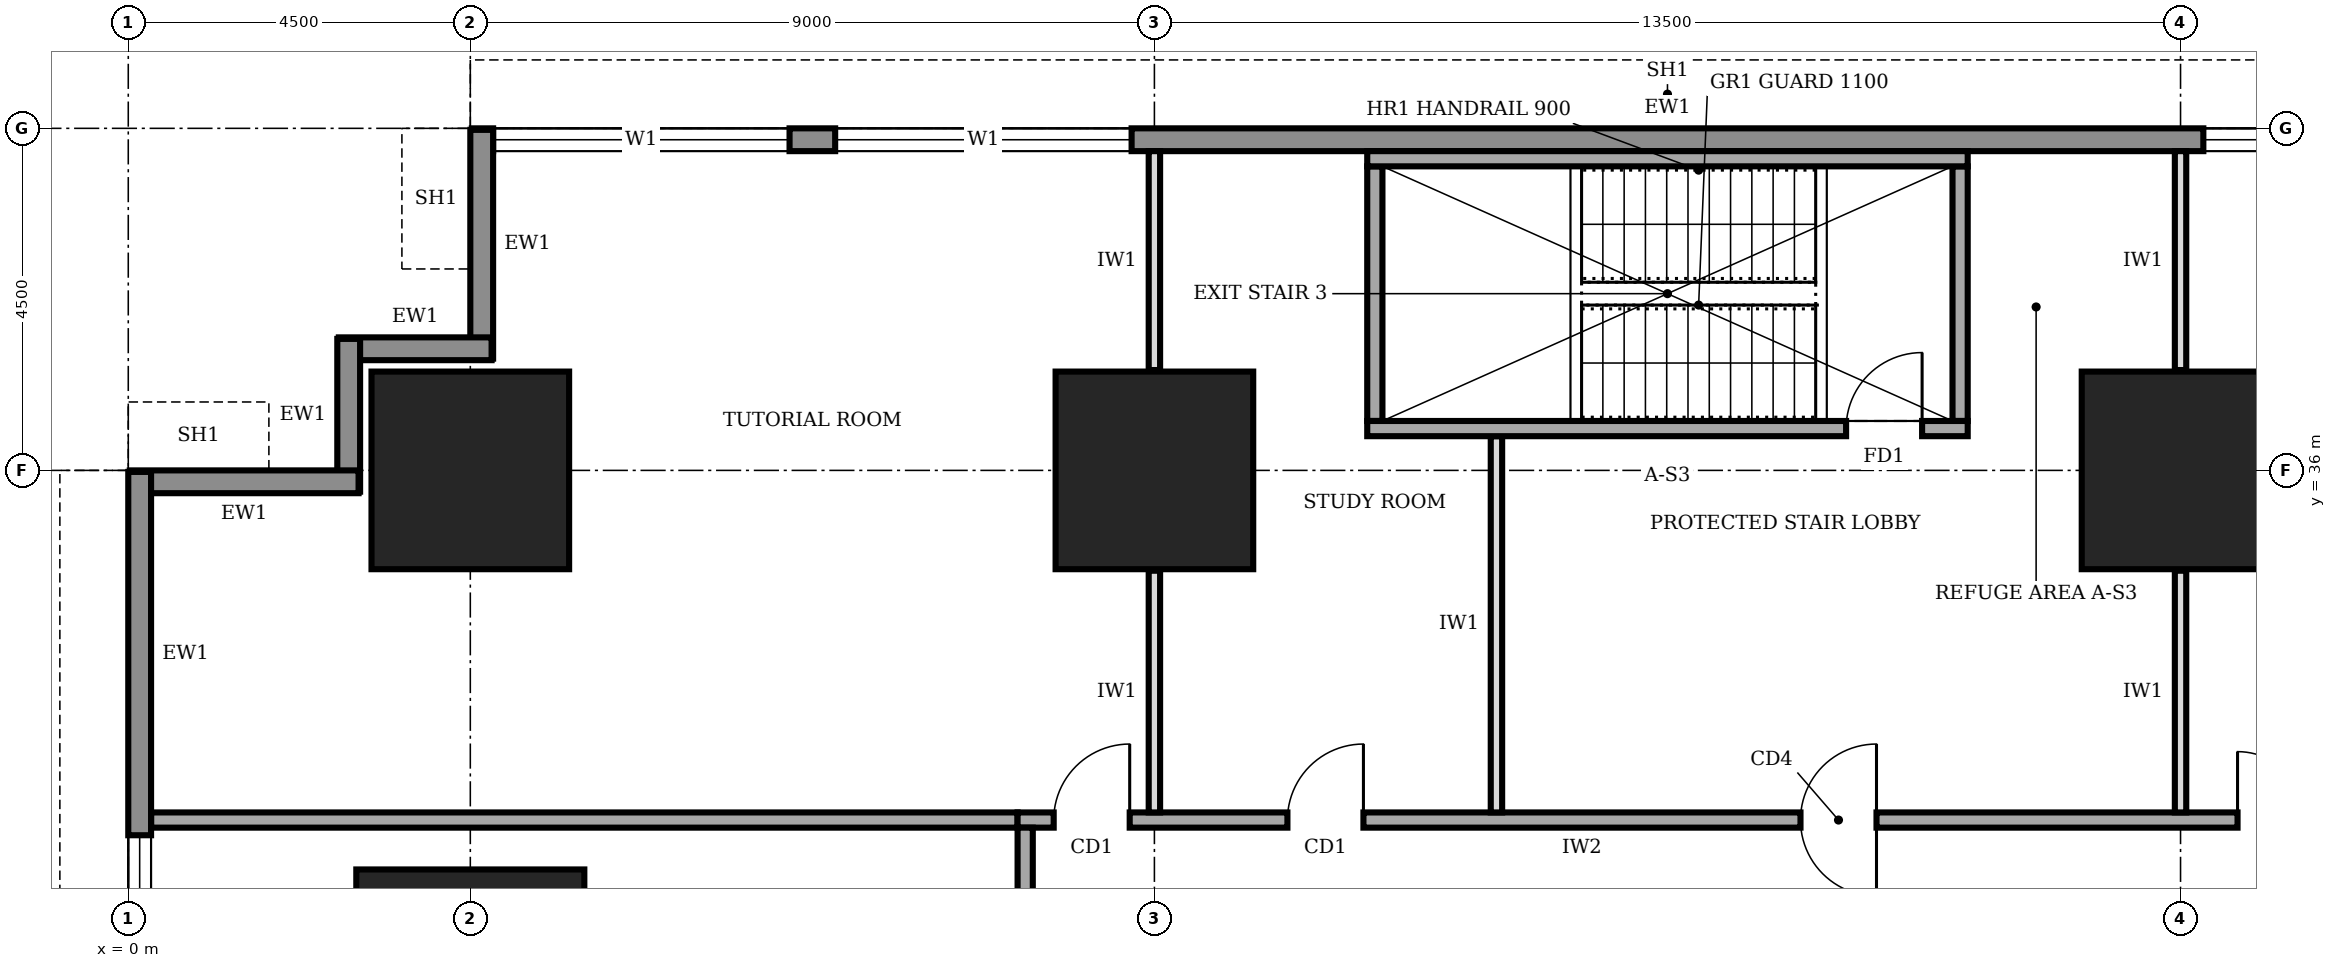
"""IFC4 building model, lengths in metres.
Left out: names, types, materials, properties, quantities, classifications, styles, units other than length and angle.
Written with IfcOpenShell. Run it as: python <this file> out.ifc"""

import sys

from ifc_helpers import new_model, si_unit, direction, frame, frame_2d, origin, origin_2d, place, context, subcontext, project, spatial, rectangle, extrude, element, fill, save


model = new_model("IFC4")
c1 = context("Model", 3, precision=1e-05, world=origin(), true_north=direction((0.0, 1.0)))
c2 = subcontext(c1, "Body", "Model", "MODEL_VIEW")
j1 = project(units=[si_unit("LENGTHUNIT", "METRE"), si_unit("PLANEANGLEUNIT", "RADIAN")], contexts=[c1])
p1 = place(None, origin())
s1 = spatial("IfcSite", under=j1, at=p1, CompositionType="ELEMENT")
p2 = place(p1, origin())
s2 = spatial("IfcBuilding", under=s1, at=p2, CompositionType="ELEMENT")
p3 = place(p2, frame((0.0, 0.0, 41.0)))
s3 = spatial("IfcBuildingStorey", under=s2, at=p3, CompositionType="ELEMENT", Elevation=41.0)
p4 = place(p3, frame((4.5, 29.25, 0.0), z_axis=(0.0, 0.0, 1.0), x_axis=(1.0, 0.0, 0.0)))
e1 = element("IfcColumn", 1, at=p4, inside=s3, PredefinedType="COLUMN", context=c2, shape_type="SweptSolid", body=[
    extrude(rectangle(XDim=3.0, YDim=3.0, at=origin_2d()), origin(), (0.0, 0.0, 1.0), 4.0),
])
for number, where, z_axis, x_axis in (
    (2, (4.5, 36.0, 0.0), (0.0, 0.0, 1.0), (1.0, 0.0, 0.0)),
    (3, (13.5, 36.0, 0.0), (0.0, 0.0, 1.0), (1.0, 0.0, 0.0)),
    (4, (27.0, 36.0, 0.0), (0.0, 0.0, 1.0), (1.0, 0.0, 0.0)),
):
    element("IfcColumn", number, at=place(p3, frame(where, z_axis=z_axis, x_axis=x_axis)), inside=s3, PredefinedType="COLUMN", context=c2, shape_type="SweptSolid", body=[
        extrude(rectangle(XDim=2.6, YDim=2.6, at=origin_2d()), origin(), (0.0, 0.0, 1.0), 4.0),
    ])
p5 = place(p3, frame((35.98, 40.35, 0.0), z_axis=(0.0, 0.0, 1.0), x_axis=(-1.0, 0.0, 0.0)))
e5 = element("IfcWall", 5, at=p5, inside=s3, PredefinedType="STANDARD", context=c2, shape_type="SweptSolid", body=[
    extrude(rectangle(XDim=31.46, YDim=0.3, at=frame_2d((15.73, 0.0))), origin(), (0.0, 0.0, 1.0), 3.75),
])
p6 = place(p5, frame((27.28, 0.0, 0.9)))
e6 = element("IfcOpeningElement", 6, at=p6, cuts=e5, PredefinedType="OPENING", context=c2, shape_type="SweptSolid", body=[
    extrude(rectangle(XDim=3.9, YDim=2.2, at=frame_2d((1.95, 1.1))), frame((0.0, 0.16, 0.0), z_axis=(0.0, -1.0, 0.0), x_axis=(1.0, 0.0, 0.0)), (0.0, 0.0, 1.0), 0.32),
])
p7 = place(p5, frame((22.78, 0.0, 0.9)))
e7 = element("IfcOpeningElement", 7, at=p7, cuts=e5, PredefinedType="OPENING", context=c2, shape_type="SweptSolid", body=[
    extrude(rectangle(XDim=3.9, YDim=2.2, at=frame_2d((1.95, 1.1))), frame((0.0, 0.16, 0.0), z_axis=(0.0, -1.0, 0.0), x_axis=(1.0, 0.0, 0.0)), (0.0, 0.0, 1.0), 0.32),
])
p8 = place(p5, frame((4.78, 0.0, 0.9)))
e8 = element("IfcOpeningElement", 8, at=p8, cuts=e5, PredefinedType="OPENING", context=c2, shape_type="SweptSolid", body=[
    extrude(rectangle(XDim=3.9, YDim=2.2, at=frame_2d((1.95, 1.1))), frame((0.0, 0.16, 0.0), z_axis=(0.0, -1.0, 0.0), x_axis=(1.0, 0.0, 0.0)), (0.0, 0.0, 1.0), 0.32),
])
p9 = place(p3, frame((4.65, 40.48, 0.0), z_axis=(0.0, 0.0, 1.0), x_axis=(0.0, -1.0, 0.0)))
e9 = element("IfcWall", 9, at=p9, inside=s3, PredefinedType="STANDARD", context=c2, shape_type="SweptSolid", body=[
    extrude(rectangle(XDim=3.01, YDim=0.3, at=frame_2d((1.505, 0.0))), origin(), (0.0, 0.0, 1.0), 2.85),
])
for number, where, z_axis, x_axis in (
    (10, (4.78, 37.6, 0.0), (0.0, 0.0, 1.0), (-1.0, 0.0, 0.0)),
    (11, (2.9, 37.73, 0.0), (0.0, 0.0, 1.0), (0.0, -1.0, 0.0)),
):
    element("IfcWall", number, at=place(p3, frame(where, z_axis=z_axis, x_axis=x_axis)), inside=s3, PredefinedType="STANDARD", context=c2, shape_type="SweptSolid", body=[
        extrude(rectangle(XDim=2.01, YDim=0.3, at=frame_2d((1.005, 0.0))), origin(), (0.0, 0.0, 1.0), 3.75),
    ])
p10 = place(p3, frame((3.03, 35.85, 0.0), z_axis=(0.0, 0.0, 1.0), x_axis=(-1.0, 0.0, 0.0)))
e12 = element("IfcWall", 12, at=p10, inside=s3, PredefinedType="STANDARD", context=c2, shape_type="SweptSolid", body=[
    extrude(rectangle(XDim=3.01, YDim=0.3, at=frame_2d((1.505, 0.0))), origin(), (0.0, 0.0, 1.0), 2.85),
])
p11 = place(p3, frame((0.15, 35.98, 0.0), z_axis=(0.0, 0.0, 1.0), x_axis=(0.0, -1.0, 0.0)))
e13 = element("IfcWall", 13, at=p11, inside=s3, PredefinedType="STANDARD", context=c2, shape_type="SweptSolid", body=[
    extrude(rectangle(XDim=31.46, YDim=0.3, at=frame_2d((15.73, 0.0))), origin(), (0.0, 0.0, 1.0), 3.75),
])
p12 = place(p11, frame((27.28, 0.0, 0.9)))
e14 = element("IfcOpeningElement", 14, at=p12, cuts=e13, PredefinedType="OPENING", context=c2, shape_type="SweptSolid", body=[
    extrude(rectangle(XDim=3.9, YDim=2.2, at=frame_2d((1.95, 1.1))), frame((0.0, 0.16, 0.0), z_axis=(0.0, -1.0, 0.0), x_axis=(1.0, 0.0, 0.0)), (0.0, 0.0, 1.0), 0.32),
])
p13 = place(p11, frame((22.78, 0.0, 0.9)))
e15 = element("IfcOpeningElement", 15, at=p13, cuts=e13, PredefinedType="OPENING", context=c2, shape_type="SweptSolid", body=[
    extrude(rectangle(XDim=3.9, YDim=2.2, at=frame_2d((1.95, 1.1))), frame((0.0, 0.16, 0.0), z_axis=(0.0, -1.0, 0.0), x_axis=(1.0, 0.0, 0.0)), (0.0, 0.0, 1.0), 0.32),
])
p14 = place(p11, frame((18.28, 0.0, 0.9)))
e16 = element("IfcOpeningElement", 16, at=p14, cuts=e13, PredefinedType="OPENING", context=c2, shape_type="SweptSolid", body=[
    extrude(rectangle(XDim=3.9, YDim=2.2, at=frame_2d((1.95, 1.1))), frame((0.0, 0.16, 0.0), z_axis=(0.0, -1.0, 0.0), x_axis=(1.0, 0.0, 0.0)), (0.0, 0.0, 1.0), 0.32),
])
p15 = place(p11, frame((13.78, 0.0, 0.9)))
e17 = element("IfcOpeningElement", 17, at=p15, cuts=e13, PredefinedType="OPENING", context=c2, shape_type="SweptSolid", body=[
    extrude(rectangle(XDim=3.9, YDim=2.2, at=frame_2d((1.95, 1.1))), frame((0.0, 0.16, 0.0), z_axis=(0.0, -1.0, 0.0), x_axis=(1.0, 0.0, 0.0)), (0.0, 0.0, 1.0), 0.32),
])
p16 = place(p11, frame((9.28, 0.0, 0.9)))
e18 = element("IfcOpeningElement", 18, at=p16, cuts=e13, PredefinedType="OPENING", context=c2, shape_type="SweptSolid", body=[
    extrude(rectangle(XDim=3.9, YDim=2.2, at=frame_2d((1.95, 1.1))), frame((0.0, 0.16, 0.0), z_axis=(0.0, -1.0, 0.0), x_axis=(1.0, 0.0, 0.0)), (0.0, 0.0, 1.0), 0.32),
])
p17 = place(p11, frame((4.78, 0.0, 0.9)))
e19 = element("IfcOpeningElement", 19, at=p17, cuts=e13, PredefinedType="OPENING", context=c2, shape_type="SweptSolid", body=[
    extrude(rectangle(XDim=3.9, YDim=2.2, at=frame_2d((1.95, 1.1))), frame((0.0, 0.16, 0.0), z_axis=(0.0, -1.0, 0.0), x_axis=(1.0, 0.0, 0.0)), (0.0, 0.0, 1.0), 0.32),
])
p18 = place(p3, frame((30.1, 31.4, 0.0), z_axis=(0.0, 0.0, 1.0), x_axis=(-1.0, 0.0, 0.0)))
e20 = element("IfcWall", 20, at=p18, inside=s3, PredefinedType="SOLIDWALL", context=c2, shape_type="SweptSolid", body=[
    extrude(rectangle(XDim=18.4, YDim=0.2, at=frame_2d((9.2, 0.0))), origin(), (0.0, 0.0, 1.0), 3.75),
])
p19 = place(p18, frame((16.925, 0.0, 0.0)))
e21 = element("IfcOpeningElement", 21, at=p19, cuts=e20, PredefinedType="OPENING", context=c2, shape_type="SweptSolid", body=[
    extrude(rectangle(XDim=1.0, YDim=2.1, at=frame_2d((0.5, 1.05))), frame((0.0, 0.11, 0.0), z_axis=(0.0, -1.0, 0.0), x_axis=(1.0, 0.0, 0.0)), (0.0, 0.0, 1.0), 0.22),
])
p20 = place(p18, frame((13.85, 0.0, 0.0)))
e22 = element("IfcOpeningElement", 22, at=p20, cuts=e20, PredefinedType="OPENING", context=c2, shape_type="SweptSolid", body=[
    extrude(rectangle(XDim=1.0, YDim=2.1, at=frame_2d((0.5, 1.05))), frame((0.0, 0.11, 0.0), z_axis=(0.0, -1.0, 0.0), x_axis=(1.0, 0.0, 0.0)), (0.0, 0.0, 1.0), 0.22),
])
p21 = place(p18, frame((7.1, 0.0, 0.0)))
e23 = element("IfcOpeningElement", 23, at=p21, cuts=e20, PredefinedType="OPENING", context=c2, shape_type="SweptSolid", body=[
    extrude(rectangle(XDim=1.0, YDim=2.1, at=frame_2d((0.5, 1.05))), frame((0.0, 0.11, 0.0), z_axis=(0.0, -1.0, 0.0), x_axis=(1.0, 0.0, 0.0)), (0.0, 0.0, 1.0), 0.22),
])
p22 = place(p18, frame((0.55, 0.0, 0.0)))
e24 = element("IfcOpeningElement", 24, at=p22, cuts=e20, PredefinedType="OPENING", context=c2, shape_type="SweptSolid", body=[
    extrude(rectangle(XDim=1.8, YDim=2.1, at=frame_2d((0.9, 1.05))), frame((0.0, 0.11, 0.0), z_axis=(0.0, -1.0, 0.0), x_axis=(1.0, 0.0, 0.0)), (0.0, 0.0, 1.0), 0.22),
])
p23 = place(p3, frame((11.8, 31.3, 0.0), z_axis=(0.0, 0.0, 1.0), x_axis=(0.0, -1.0, 0.0)))
e25 = element("IfcWall", 25, at=p23, inside=s3, PredefinedType="SOLIDWALL", context=c2, shape_type="SweptSolid", body=[
    extrude(rectangle(XDim=22.3, YDim=0.2, at=frame_2d((11.15, 0.0))), origin(), (0.0, 0.0, 1.0), 3.75),
])
p24 = place(p23, frame((19.55, 0.0, 0.0)))
e26 = element("IfcOpeningElement", 26, at=p24, cuts=e25, PredefinedType="OPENING", context=c2, shape_type="SweptSolid", body=[
    extrude(rectangle(XDim=1.0, YDim=2.1, at=frame_2d((0.5, 1.05))), frame((0.0, 0.11, 0.0), z_axis=(0.0, -1.0, 0.0), x_axis=(1.0, 0.0, 0.0)), (0.0, 0.0, 1.0), 0.22),
])
p25 = place(p23, frame((16.15, 0.0, 0.0)))
e27 = element("IfcOpeningElement", 27, at=p25, cuts=e25, PredefinedType="OPENING", context=c2, shape_type="SweptSolid", body=[
    extrude(rectangle(XDim=0.9, YDim=2.1, at=frame_2d((0.45, 1.05))), frame((0.0, 0.11, 0.0), z_axis=(0.0, -1.0, 0.0), x_axis=(1.0, 0.0, 0.0)), (0.0, 0.0, 1.0), 0.22),
])
p26 = place(p23, frame((12.95, 0.0, 0.0)))
e28 = element("IfcOpeningElement", 28, at=p26, cuts=e25, PredefinedType="OPENING", context=c2, shape_type="SweptSolid", body=[
    extrude(rectangle(XDim=0.9, YDim=2.1, at=frame_2d((0.45, 1.05))), frame((0.0, 0.11, 0.0), z_axis=(0.0, -1.0, 0.0), x_axis=(1.0, 0.0, 0.0)), (0.0, 0.0, 1.0), 0.22),
])
p27 = place(p23, frame((7.4, 0.0, 0.0)))
e29 = element("IfcOpeningElement", 29, at=p27, cuts=e25, PredefinedType="OPENING", context=c2, shape_type="SweptSolid", body=[
    extrude(rectangle(XDim=0.9, YDim=2.1, at=frame_2d((0.45, 1.05))), frame((0.0, 0.11, 0.0), z_axis=(0.0, -1.0, 0.0), x_axis=(1.0, 0.0, 0.0)), (0.0, 0.0, 1.0), 0.22),
])
p28 = place(p23, frame((4.8, 0.0, 0.0)))
e30 = element("IfcOpeningElement", 30, at=p28, cuts=e25, PredefinedType="OPENING", context=c2, shape_type="SweptSolid", body=[
    extrude(rectangle(XDim=1.0, YDim=2.1, at=frame_2d((0.5, 1.05))), frame((0.0, 0.11, 0.0), z_axis=(0.0, -1.0, 0.0), x_axis=(1.0, 0.0, 0.0)), (0.0, 0.0, 1.0), 0.22),
])
p29 = place(p23, frame((9.9, 0.0, 0.0)))
e31 = element("IfcOpeningElement", 31, at=p29, cuts=e25, PredefinedType="OPENING", context=c2, shape_type="SweptSolid", body=[
    extrude(rectangle(XDim=1.0, YDim=2.1, at=frame_2d((0.5, 1.05))), frame((0.0, 0.11, 0.0), z_axis=(0.0, -1.0, 0.0), x_axis=(1.0, 0.0, 0.0)), (0.0, 0.0, 1.0), 0.22),
])
p30 = place(p23, frame((1.55, 0.0, 0.0)))
e32 = element("IfcOpeningElement", 32, at=p30, cuts=e25, PredefinedType="OPENING", context=c2, shape_type="SweptSolid", body=[
    extrude(rectangle(XDim=1.0, YDim=2.1, at=frame_2d((0.5, 1.05))), frame((0.0, 0.11, 0.0), z_axis=(0.0, -1.0, 0.0), x_axis=(1.0, 0.0, 0.0)), (0.0, 0.0, 1.0), 0.22),
])
p31 = place(p3, frame((0.3, 31.4, 0.0), z_axis=(0.0, 0.0, 1.0), x_axis=(1.0, 0.0, 0.0)))
e33 = element("IfcWall", 33, at=p31, inside=s3, PredefinedType="SOLIDWALL", context=c2, shape_type="SweptSolid", body=[
    extrude(rectangle(XDim=11.4, YDim=0.2, at=frame_2d((5.7, 0.0))), origin(), (0.0, 0.0, 1.0), 3.75),
])
p32 = place(p3, frame((13.5, 31.5, 0.0), z_axis=(0.0, 0.0, 1.0), x_axis=(0.0, 1.0, 0.0)))
e34 = element("IfcWall", 34, at=p32, inside=s3, PredefinedType="PARTITIONING", context=c2, shape_type="SweptSolid", body=[
    extrude(rectangle(XDim=3.18, YDim=0.15, at=frame_2d((1.59, 0.0))), origin(), (0.0, 0.0, 1.0), 2.85),
])
p33 = place(p3, frame((13.5, 37.32, 0.0), z_axis=(0.0, 0.0, 1.0), x_axis=(0.0, 1.0, 0.0)))
e35 = element("IfcWall", 35, at=p33, inside=s3, PredefinedType="PARTITIONING", context=c2, shape_type="SweptSolid", body=[
    extrude(rectangle(XDim=2.88, YDim=0.15, at=frame_2d((1.44, 0.0))), origin(), (0.0, 0.0, 1.0), 2.85),
])
p34 = place(p3, frame((18.0, 31.5, 0.0), z_axis=(0.0, 0.0, 1.0), x_axis=(0.0, 1.0, 0.0)))
e36 = element("IfcWall", 36, at=p34, inside=s3, PredefinedType="PARTITIONING", context=c2, shape_type="SweptSolid", body=[
    extrude(rectangle(XDim=4.95, YDim=0.15, at=frame_2d((2.475, 0.0))), origin(), (0.0, 0.0, 1.0), 3.75),
])
p35 = place(p3, frame((27.0, 31.5, 0.0), z_axis=(0.0, 0.0, 1.0), x_axis=(0.0, 1.0, 0.0)))
e37 = element("IfcWall", 37, at=p35, inside=s3, PredefinedType="PARTITIONING", context=c2, shape_type="SweptSolid", body=[
    extrude(rectangle(XDim=3.18, YDim=0.15, at=frame_2d((1.59, 0.0))), origin(), (0.0, 0.0, 1.0), 2.85),
])
p36 = place(p3, frame((27.0, 37.32, 0.0), z_axis=(0.0, 0.0, 1.0), x_axis=(0.0, 1.0, 0.0)))
e38 = element("IfcWall", 38, at=p36, inside=s3, PredefinedType="PARTITIONING", context=c2, shape_type="SweptSolid", body=[
    extrude(rectangle(XDim=2.88, YDim=0.15, at=frame_2d((1.44, 0.0))), origin(), (0.0, 0.0, 1.0), 2.85),
])
p37 = place(p3, frame((16.3, 36.55, 0.0), z_axis=(0.0, 0.0, 1.0), x_axis=(1.0, 0.0, 0.0)))
e39 = element("IfcWall", 39, at=p37, inside=s3, PredefinedType="SOLIDWALL", context=c2, shape_type="SweptSolid", body=[
    extrude(rectangle(XDim=7.9, YDim=0.2, at=frame_2d((3.95, 0.0))), origin(), (0.0, 0.0, 1.0), 3.75),
])
p38 = place(p37, frame((6.3, 0.0, 0.0)))
e40 = element("IfcOpeningElement", 40, at=p38, cuts=e39, PredefinedType="OPENING", context=c2, shape_type="SweptSolid", body=[
    extrude(rectangle(XDim=1.0, YDim=2.1, at=frame_2d((0.5, 1.05))), frame((0.0, 0.11, 0.0), z_axis=(0.0, -1.0, 0.0), x_axis=(1.0, 0.0, 0.0)), (0.0, 0.0, 1.0), 0.22),
])
p39 = place(p3, frame((16.3, 40.1, 0.0), z_axis=(0.0, 0.0, 1.0), x_axis=(1.0, 0.0, 0.0)))
e41 = element("IfcWall", 41, at=p39, inside=s3, PredefinedType="SOLIDWALL", context=c2, shape_type="SweptSolid", body=[
    extrude(rectangle(XDim=7.9, YDim=0.2, at=frame_2d((3.95, 0.0))), origin(), (0.0, 0.0, 1.0), 3.75),
])
for number, where, z_axis, x_axis in (
    (42, (16.4, 36.65, 0.0), (0.0, 0.0, 1.0), (0.0, 1.0, 0.0)),
    (43, (24.1, 36.65, 0.0), (0.0, 0.0, 1.0), (0.0, 1.0, 0.0)),
):
    element("IfcWall", number, at=place(p3, frame(where, z_axis=z_axis, x_axis=x_axis)), inside=s3, PredefinedType="SOLIDWALL", context=c2, shape_type="SweptSolid", body=[
        extrude(rectangle(XDim=3.35, YDim=0.2, at=frame_2d((1.675, 0.0))), origin(), (0.0, 0.0, 1.0), 3.75),
    ])
p40 = place(p6, origin())
e44 = element("IfcWindow", 44, at=p40, inside=s3, PartitioningType="SINGLE_PANEL", PredefinedType="WINDOW", context=c2, shape_type="SweptSolid", body=[
    extrude(rectangle(XDim=3.9, YDim=2.2, at=frame_2d((1.95, 1.1))), frame((0.0, 0.03, 0.0), z_axis=(0.0, -1.0, 0.0), x_axis=(1.0, 0.0, 0.0)), (0.0, 0.0, 1.0), 0.06),
])
fill(e6, e44)
p41 = place(p7, origin())
e45 = element("IfcWindow", 45, at=p41, inside=s3, PartitioningType="SINGLE_PANEL", PredefinedType="WINDOW", context=c2, shape_type="SweptSolid", body=[
    extrude(rectangle(XDim=3.9, YDim=2.2, at=frame_2d((1.95, 1.1))), frame((0.0, 0.03, 0.0), z_axis=(0.0, -1.0, 0.0), x_axis=(1.0, 0.0, 0.0)), (0.0, 0.0, 1.0), 0.06),
])
fill(e7, e45)
p42 = place(p8, origin())
e46 = element("IfcWindow", 46, at=p42, inside=s3, PartitioningType="SINGLE_PANEL", PredefinedType="WINDOW", context=c2, shape_type="SweptSolid", body=[
    extrude(rectangle(XDim=3.9, YDim=2.2, at=frame_2d((1.95, 1.1))), frame((0.0, 0.03, 0.0), z_axis=(0.0, -1.0, 0.0), x_axis=(1.0, 0.0, 0.0)), (0.0, 0.0, 1.0), 0.06),
])
fill(e8, e46)
p43 = place(p17, origin())
e47 = element("IfcWindow", 47, at=p43, inside=s3, PartitioningType="SINGLE_PANEL", PredefinedType="WINDOW", context=c2, shape_type="SweptSolid", body=[
    extrude(rectangle(XDim=3.9, YDim=2.2, at=frame_2d((1.95, 1.1))), frame((0.0, 0.03, 0.0), z_axis=(0.0, -1.0, 0.0), x_axis=(1.0, 0.0, 0.0)), (0.0, 0.0, 1.0), 0.06),
])
fill(e19, e47)
p44 = place(p19, frame((1.0, 0.0, 0.0), z_axis=(0.0, 0.0, 1.0), x_axis=(-1.0, 0.0, 0.0)))
e48 = element("IfcDoor", 48, at=p44, inside=s3, OperationType="SINGLE_SWING_RIGHT", PredefinedType="DOOR", context=c2, shape_type="SweptSolid", body=[
    extrude(rectangle(XDim=1.0, YDim=2.1, at=frame_2d((0.5, 1.05))), frame((0.0, 0.025, 0.0), z_axis=(0.0, -1.0, 0.0), x_axis=(1.0, 0.0, 0.0)), (0.0, 0.0, 1.0), 0.05),
])
fill(e21, e48)
p45 = place(p20, frame((1.0, 0.0, 0.0), z_axis=(0.0, 0.0, 1.0), x_axis=(-1.0, 0.0, 0.0)))
e49 = element("IfcDoor", 49, at=p45, inside=s3, OperationType="SINGLE_SWING_RIGHT", PredefinedType="DOOR", context=c2, shape_type="SweptSolid", body=[
    extrude(rectangle(XDim=1.0, YDim=2.1, at=frame_2d((0.5, 1.05))), frame((0.0, 0.025, 0.0), z_axis=(0.0, -1.0, 0.0), x_axis=(1.0, 0.0, 0.0)), (0.0, 0.0, 1.0), 0.05),
])
fill(e22, e49)
p46 = place(p21, origin())
e50 = element("IfcDoor", 50, at=p46, inside=s3, OperationType="DOUBLE_SWING_LEFT", PredefinedType="DOOR", context=c2, shape_type="SweptSolid", body=[
    extrude(rectangle(XDim=1.0, YDim=2.1, at=frame_2d((0.5, 1.05))), frame((0.0, 0.025, 0.0), z_axis=(0.0, -1.0, 0.0), x_axis=(1.0, 0.0, 0.0)), (0.0, 0.0, 1.0), 0.05),
])
fill(e23, e50)
p47 = place(p22, frame((1.8, 0.0, 0.0), z_axis=(0.0, 0.0, 1.0), x_axis=(-1.0, 0.0, 0.0)))
e51 = element("IfcDoor", 51, at=p47, inside=s3, OperationType="DOUBLE_DOOR_SINGLE_SWING", PredefinedType="DOOR", context=c2, shape_type="SweptSolid", body=[
    extrude(rectangle(XDim=1.8, YDim=2.1, at=frame_2d((0.9, 1.05))), frame((0.0, 0.025, 0.0), z_axis=(0.0, -1.0, 0.0), x_axis=(1.0, 0.0, 0.0)), (0.0, 0.0, 1.0), 0.05),
])
fill(e24, e51)
p48 = place(p38, origin())
e52 = element("IfcDoor", 52, at=p48, inside=s3, OperationType="SINGLE_SWING_RIGHT", PredefinedType="DOOR", context=c2, shape_type="SweptSolid", body=[
    extrude(rectangle(XDim=1.0, YDim=2.1, at=frame_2d((0.5, 1.05))), frame((0.0, 0.025, 0.0), z_axis=(0.0, -1.0, 0.0), x_axis=(1.0, 0.0, 0.0)), (0.0, 0.0, 1.0), 0.05),
])
fill(e40, e52)
save(model, sys.argv[1])
